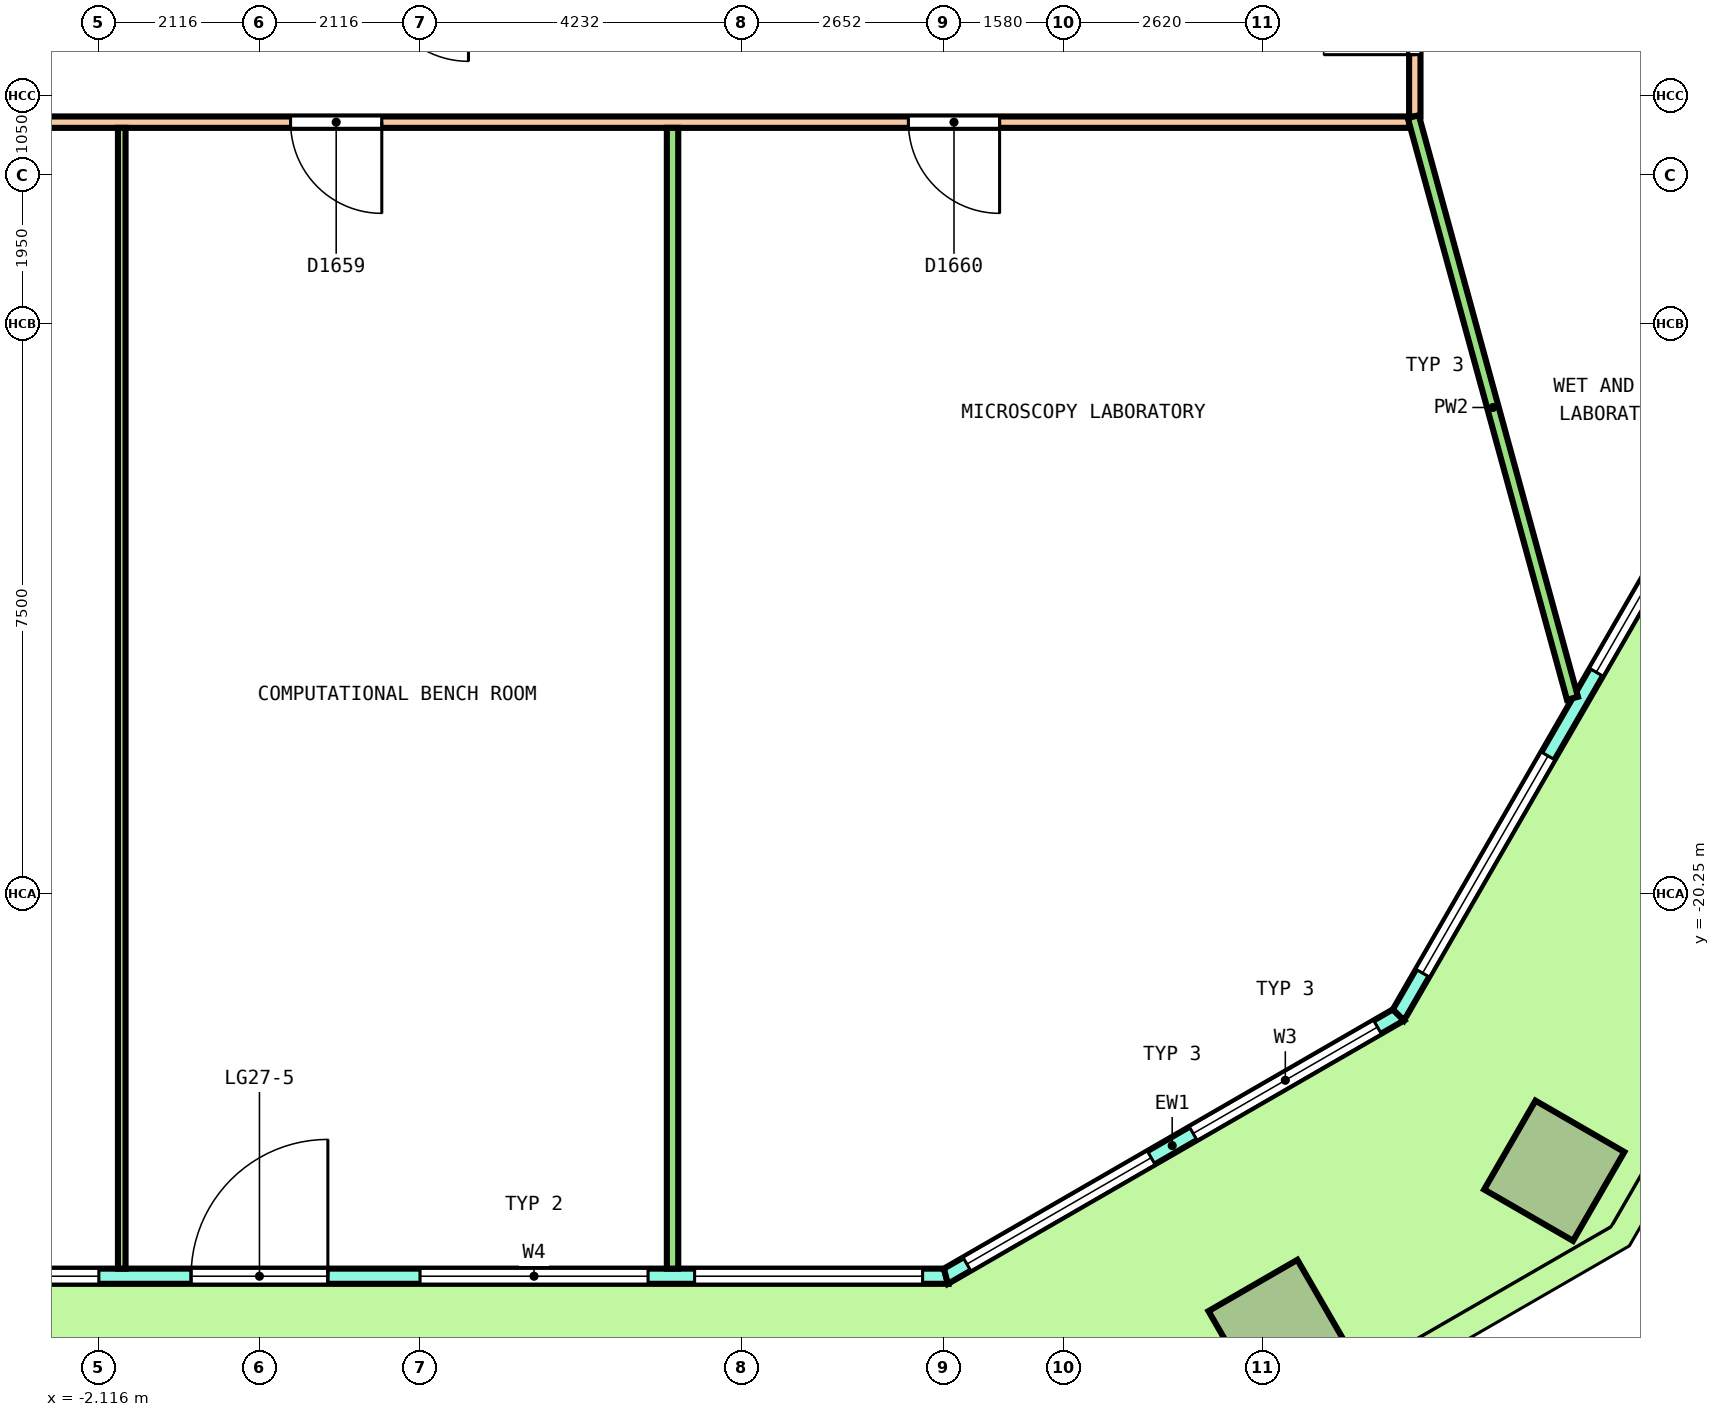
"""IFC4 building model, lengths in metres.
Left out: names, types, materials, properties, quantities, classifications, styles, units other than length and angle.
Written with IfcOpenShell. Run it as: python <this file> out.ifc"""

import sys

from ifc_helpers import new_model, si_unit, direction, frame, frame_2d, origin, origin_2d, place, context, subcontext, project, spatial, polyline, rectangle, outline, extrude, element, fill, save


model = new_model("IFC4")
c1 = context("Model", 3, precision=1e-05, world=origin(), true_north=direction((0.0, 1.0)))
c2 = subcontext(c1, "Body", "Model", "MODEL_VIEW")
j1 = project(units=[si_unit("LENGTHUNIT", "METRE"), si_unit("PLANEANGLEUNIT", "RADIAN")], contexts=[c1])
p1 = place(None, origin())
s1 = spatial("IfcSite", under=j1, at=p1, CompositionType="ELEMENT")
p2 = place(p1, origin())
s2 = spatial("IfcBuilding", under=s1, at=p2, CompositionType="ELEMENT")
p3 = place(p2, frame((0.0, 0.0, 126.4)))
s3 = spatial("IfcBuildingStorey", under=s2, at=p3, CompositionType="ELEMENT", Elevation=126.4)
for number, where, z_axis, x_axis in (
    (1, (13.408, -25.989, 0.0), (0.0, 0.0, 1.0), (0.866, 0.5, 0.0)),
    (2, (17.035, -23.895, 0.0), (0.0, 0.0, 1.0), (0.5, 0.866, 0.0)),
):
    element("IfcColumn", number, at=place(p3, frame(where, z_axis=z_axis, x_axis=x_axis)), inside=s3, PredefinedType="COLUMN", context=c2, shape_type="SweptSolid", body=[
        extrude(rectangle(XDim=1.35, YDim=1.35, at=origin_2d()), origin(), (0.0, 0.0, 1.0), 4.05),
    ])
p4 = place(p3, frame((-9.031, -25.283, 0.0), z_axis=(0.0, 0.0, 1.0), x_axis=(1.0, 0.0, 0.0)))
e3 = element("IfcWall", 3, at=p4, inside=s3, PredefinedType="SOLIDWALL", context=c2, shape_type="SweptSolid", body=[
    extrude(outline(polyline([(-0.027, -0.1), (0.979, -0.1), (1.986, -0.1), (2.992, -0.1), (3.999, -0.1), (5.005, -0.1), (6.012, -0.1), (7.018, -0.1), (8.025, -0.1), (9.031, -0.1), (10.038, -0.1), (11.044, -0.1), (12.051, -0.1), (13.057, -0.1), (14.063, -0.1), (15.07, -0.1), (16.076, -0.1), (17.083, -0.1), (18.089, -0.1), (18.036, 0.1), (17.035, 0.1), (16.035, 0.1), (15.034, 0.1), (14.034, 0.1), (13.033, 0.1), (12.033, 0.1), (11.032, 0.1), (10.032, 0.1), (9.031, 0.1), (8.031, 0.1), (7.03, 0.1), (6.03, 0.1), (5.029, 0.1), (4.029, 0.1), (3.028, 0.1), (2.028, 0.1), (1.027, 0.1), (0.027, 0.1), (-0.027, -0.1)])), origin(), (0.0, 0.0, 1.0), 4.1),
])
p5 = place(p4, frame((0.306, 0.0, 0.1)))
e4 = element("IfcOpeningElement", 4, at=p5, cuts=e3, PredefinedType="OPENING", context=c2, shape_type="SweptSolid", body=[
    extrude(rectangle(XDim=3.0, YDim=2.9, at=frame_2d((1.5, 1.45))), frame((0.0, 0.11, 0.0), z_axis=(0.0, -1.0, 0.0), x_axis=(1.0, 0.0, 0.0)), (0.0, 0.0, 1.0), 0.22),
])
p6 = place(p4, frame((3.919, 0.0, 0.1)))
e5 = element("IfcOpeningElement", 5, at=p6, cuts=e3, PredefinedType="OPENING", context=c2, shape_type="SweptSolid", body=[
    extrude(rectangle(XDim=3.0, YDim=2.9, at=frame_2d((1.5, 1.45))), frame((0.0, 0.11, 0.0), z_axis=(0.0, -1.0, 0.0), x_axis=(1.0, 0.0, 0.0)), (0.0, 0.0, 1.0), 0.22),
])
p7 = place(p4, frame((8.131, 0.0, 0.0)))
e6 = element("IfcOpeningElement", 6, at=p7, cuts=e3, PredefinedType="OPENING", context=c2, shape_type="SweptSolid", body=[
    extrude(rectangle(XDim=1.8, YDim=2.4, at=frame_2d((0.9, 1.2))), frame((0.0, 0.11, 0.0), z_axis=(0.0, -1.0, 0.0), x_axis=(1.0, 0.0, 0.0)), (0.0, 0.0, 1.0), 0.22),
])
p8 = place(p4, frame((8.131, 0.0, 2.55)))
e7 = element("IfcOpeningElement", 7, at=p8, cuts=e3, PredefinedType="OPENING", context=c2, shape_type="SweptSolid", body=[
    extrude(rectangle(XDim=1.8, YDim=0.45, at=frame_2d((0.9, 0.225))), frame((0.0, 0.11, 0.0), z_axis=(0.0, -1.0, 0.0), x_axis=(1.0, 0.0, 0.0)), (0.0, 0.0, 1.0), 0.22),
])
p9 = place(p4, frame((11.144, 0.0, 0.1)))
e8 = element("IfcOpeningElement", 8, at=p9, cuts=e3, PredefinedType="OPENING", context=c2, shape_type="SweptSolid", body=[
    extrude(rectangle(XDim=3.0, YDim=2.9, at=frame_2d((1.5, 1.45))), frame((0.0, 0.11, 0.0), z_axis=(0.0, -1.0, 0.0), x_axis=(1.0, 0.0, 0.0)), (0.0, 0.0, 1.0), 0.22),
])
p10 = place(p4, frame((14.756, 0.0, 0.1)))
e9 = element("IfcOpeningElement", 9, at=p10, cuts=e3, PredefinedType="OPENING", context=c2, shape_type="SweptSolid", body=[
    extrude(rectangle(XDim=3.0, YDim=2.9, at=frame_2d((1.5, 1.45))), frame((0.0, 0.11, 0.0), z_axis=(0.0, -1.0, 0.0), x_axis=(1.0, 0.0, 0.0)), (0.0, 0.0, 1.0), 0.22),
])
p11 = place(p3, frame((9.031, -25.283, 0.0), z_axis=(0.0, 0.0, 1.0), x_axis=(0.866029458321, 0.49999297727, 0.0)))
e10 = element("IfcWall", 10, at=p11, inside=s3, PredefinedType="SOLIDWALL", context=c2, shape_type="SweptSolid", body=[
    extrude(outline(polyline([(-0.027, -0.1), (1.128, -0.1), (2.282, -0.1), (3.437, -0.1), (4.592, -0.1), (5.747, -0.1), (6.901, -0.1), (6.848, 0.1), (5.711, 0.1), (4.574, 0.1), (3.437, 0.1), (2.301, 0.1), (1.164, 0.1), (0.027, 0.1), (-0.027, -0.1)])), origin(), (0.0, 0.0, 1.0), 4.1),
])
p12 = place(p11, frame((0.319, 0.0, 0.1)))
e11 = element("IfcOpeningElement", 11, at=p12, cuts=e10, PredefinedType="OPENING", context=c2, shape_type="SweptSolid", body=[
    extrude(rectangle(XDim=2.8, YDim=2.9, at=frame_2d((1.4, 1.45))), frame((0.0, 0.11, 0.0), z_axis=(0.0, -1.0, 0.0), x_axis=(1.0, 0.0, 0.0)), (0.0, 0.0, 1.0), 0.22),
])
p13 = place(p11, frame((3.756, 0.0, 0.1)))
e12 = element("IfcOpeningElement", 12, at=p13, cuts=e10, PredefinedType="OPENING", context=c2, shape_type="SweptSolid", body=[
    extrude(rectangle(XDim=2.8, YDim=2.9, at=frame_2d((1.4, 1.45))), frame((0.0, 0.11, 0.0), z_axis=(0.0, -1.0, 0.0), x_axis=(1.0, 0.0, 0.0)), (0.0, 0.0, 1.0), 0.22),
])
p14 = place(p3, frame((14.985, -21.845, 0.0), z_axis=(0.0, 0.0, 1.0), x_axis=(0.50000204422, 0.86602422355, 0.0)))
e13 = element("IfcWall", 13, at=p14, inside=s3, PredefinedType="SOLIDWALL", context=c2, shape_type="SweptSolid", body=[
    extrude(outline(polyline([(-0.027, -0.1), (1.014, -0.1), (2.055, -0.1), (3.097, -0.1), (4.138, -0.1), (5.179, -0.1), (6.22, -0.1), (7.261, -0.1), (8.303, -0.1), (9.344, -0.1), (10.385, -0.1), (11.426, -0.1), (12.468, -0.1), (13.509, -0.1), (14.55, -0.1), (15.591, -0.1), (16.632, -0.1), (17.673, -0.1), (18.715, -0.1), (19.756, -0.1), (20.797, -0.1), (21.838, -0.1), (22.879, -0.1), (22.826, 0.1), (21.789, 0.1), (20.753, 0.1), (19.717, 0.1), (18.68, 0.1), (17.644, 0.1), (16.608, 0.1), (15.572, 0.1), (14.535, 0.1), (13.499, 0.1), (12.463, 0.1), (11.426, 0.1), (10.39, 0.1), (9.354, 0.1), (8.317, 0.1), (7.281, 0.1), (6.245, 0.1), (5.208, 0.1), (4.172, 0.1), (3.136, 0.1), (2.099, 0.1), (1.063, 0.1), (0.027, 0.1), (-0.027, -0.1)])), origin(), (0.0, 0.0, 1.0), 4.1),
])
p15 = place(p14, frame((0.635, 0.0, 0.1)))
e14 = element("IfcOpeningElement", 14, at=p15, cuts=e13, PredefinedType="OPENING", context=c2, shape_type="SweptSolid", body=[
    extrude(rectangle(XDim=3.3, YDim=2.9, at=frame_2d((1.65, 1.45))), frame((0.0, 0.11, 0.0), z_axis=(0.0, -1.0, 0.0), x_axis=(1.0, 0.0, 0.0)), (0.0, 0.0, 1.0), 0.22),
])
p16 = place(p14, frame((5.206, 0.0, 0.1)))
e15 = element("IfcOpeningElement", 15, at=p16, cuts=e13, PredefinedType="OPENING", context=c2, shape_type="SweptSolid", body=[
    extrude(rectangle(XDim=3.3, YDim=2.9, at=frame_2d((1.65, 1.45))), frame((0.0, 0.11, 0.0), z_axis=(0.0, -1.0, 0.0), x_axis=(1.0, 0.0, 0.0)), (0.0, 0.0, 1.0), 0.22),
])
p17 = place(p14, frame((10.526, 0.0, 0.0)))
e16 = element("IfcOpeningElement", 16, at=p17, cuts=e13, PredefinedType="OPENING", context=c2, shape_type="SweptSolid", body=[
    extrude(rectangle(XDim=1.8, YDim=2.4, at=frame_2d((0.9, 1.2))), frame((0.0, 0.11, 0.0), z_axis=(0.0, -1.0, 0.0), x_axis=(1.0, 0.0, 0.0)), (0.0, 0.0, 1.0), 0.22),
])
p18 = place(p14, frame((10.526, 0.0, 2.55)))
e17 = element("IfcOpeningElement", 17, at=p18, cuts=e13, PredefinedType="OPENING", context=c2, shape_type="SweptSolid", body=[
    extrude(rectangle(XDim=1.8, YDim=0.45, at=frame_2d((0.9, 0.225))), frame((0.0, 0.11, 0.0), z_axis=(0.0, -1.0, 0.0), x_axis=(1.0, 0.0, 0.0)), (0.0, 0.0, 1.0), 0.22),
])
p19 = place(p14, frame((14.347, 0.0, 0.1)))
e18 = element("IfcOpeningElement", 18, at=p19, cuts=e13, PredefinedType="OPENING", context=c2, shape_type="SweptSolid", body=[
    extrude(rectangle(XDim=3.3, YDim=2.9, at=frame_2d((1.65, 1.45))), frame((0.0, 0.11, 0.0), z_axis=(0.0, -1.0, 0.0), x_axis=(1.0, 0.0, 0.0)), (0.0, 0.0, 1.0), 0.22),
])
p20 = place(p14, frame((18.917, 0.0, 0.1)))
e19 = element("IfcOpeningElement", 19, at=p20, cuts=e13, PredefinedType="OPENING", context=c2, shape_type="SweptSolid", body=[
    extrude(rectangle(XDim=3.3, YDim=2.9, at=frame_2d((1.65, 1.45))), frame((0.0, 0.11, 0.0), z_axis=(0.0, -1.0, 0.0), x_axis=(1.0, 0.0, 0.0)), (0.0, 0.0, 1.0), 0.22),
])
p21 = place(p3, frame((15.2, -10.025, 0.0), z_axis=(0.0, 0.0, 1.0), x_axis=(0.0, 1.0, 0.0)))
e20 = element("IfcWall", 20, at=p21, inside=s3, PredefinedType="PARTITIONING", context=c2, shape_type="SweptSolid", body=[
    extrude(rectangle(XDim=8.75, YDim=0.15, at=frame_2d((4.375, 0.0))), origin(), (0.0, 0.0, 1.0), 3.05),
])
p22 = place(p21, frame((0.813, 0.0, 0.0)))
e21 = element("IfcOpeningElement", 21, at=p22, cuts=e20, PredefinedType="OPENING", context=c2, shape_type="SweptSolid", body=[
    extrude(rectangle(XDim=1.2, YDim=2.1, at=frame_2d((0.6, 1.05))), frame((0.0, 0.085, 0.0), z_axis=(0.0, -1.0, 0.0), x_axis=(1.0, 0.0, 0.0)), (0.0, 0.0, 1.0), 0.17),
])
p23 = place(p3, frame((-15.275, -10.1, 0.0), z_axis=(0.0, 0.0, 1.0), x_axis=(1.0, 0.0, 0.0)))
e22 = element("IfcWall", 22, at=p23, inside=s3, PredefinedType="PARTITIONING", context=c2, shape_type="SweptSolid", body=[
    extrude(rectangle(XDim=30.4, YDim=0.15, at=frame_2d((15.2, 0.0))), origin(), (0.0, 0.0, 1.0), 3.05),
])
p24 = place(p23, frame((1.506, 0.0, 0.0)))
e23 = element("IfcOpeningElement", 23, at=p24, cuts=e22, PredefinedType="OPENING", context=c2, shape_type="SweptSolid", body=[
    extrude(rectangle(XDim=1.0, YDim=2.1, at=frame_2d((0.5, 1.05))), frame((0.0, 0.085, 0.0), z_axis=(0.0, -1.0, 0.0), x_axis=(1.0, 0.0, 0.0)), (0.0, 0.0, 1.0), 0.17),
])
p25 = place(p23, frame((7.84, 0.0, 0.0)))
e24 = element("IfcOpeningElement", 24, at=p25, cuts=e22, PredefinedType="OPENING", context=c2, shape_type="SweptSolid", body=[
    extrude(rectangle(XDim=1.0, YDim=2.1, at=frame_2d((0.5, 1.05))), frame((0.0, 0.085, 0.0), z_axis=(0.0, -1.0, 0.0), x_axis=(1.0, 0.0, 0.0)), (0.0, 0.0, 1.0), 0.17),
])
p26 = place(p23, frame((15.685, 0.0, 0.0)))
e25 = element("IfcOpeningElement", 25, at=p26, cuts=e22, PredefinedType="OPENING", context=c2, shape_type="SweptSolid", body=[
    extrude(rectangle(XDim=1.2, YDim=2.1, at=frame_2d((0.6, 1.05))), frame((0.0, 0.085, 0.0), z_axis=(0.0, -1.0, 0.0), x_axis=(1.0, 0.0, 0.0)), (0.0, 0.0, 1.0), 0.17),
])
p27 = place(p23, frame((23.812, 0.0, 0.0)))
e26 = element("IfcOpeningElement", 26, at=p27, cuts=e22, PredefinedType="OPENING", context=c2, shape_type="SweptSolid", body=[
    extrude(rectangle(XDim=1.2, YDim=2.1, at=frame_2d((0.6, 1.05))), frame((0.0, 0.085, 0.0), z_axis=(0.0, -1.0, 0.0), x_axis=(1.0, 0.0, 0.0)), (0.0, 0.0, 1.0), 0.17),
])
p28 = place(p3, frame((5.435, -25.183, 0.0), z_axis=(0.0, 0.0, 1.0), x_axis=(0.0, 1.0, 0.0)))
e27 = element("IfcWall", 27, at=p28, inside=s3, PredefinedType="PARTITIONING", context=c2, shape_type="SweptSolid", body=[
    extrude(rectangle(XDim=15.008, YDim=0.15, at=frame_2d((7.504, 0.0))), origin(), (0.0, 0.0, 1.0), 3.05),
])
p29 = place(p3, frame((15.18, -10.028, 0.0), z_axis=(0.0, 0.0, 1.0), x_axis=(0.263973985393, -0.964529799973, 0.0)))
e28 = element("IfcWall", 28, at=p29, inside=s3, PredefinedType="PARTITIONING", context=c2, shape_type="SweptSolid", body=[
    extrude(rectangle(XDim=7.934, YDim=0.15, at=frame_2d((3.967, 0.0))), origin(), (0.0, 0.0, 1.0), 3.05),
])
p30 = place(p3, frame((-1.812, -25.183, 0.0), z_axis=(0.0, 0.0, 1.0), x_axis=(0.0, 1.0, 0.0)))
e29 = element("IfcWall", 29, at=p30, inside=s3, PredefinedType="PARTITIONING", context=c2, shape_type="SweptSolid", body=[
    extrude(rectangle(XDim=15.008, YDim=0.1, at=frame_2d((7.504, 0.0))), origin(), (0.0, 0.0, 1.0), 3.05),
])
p31 = place(p6, origin())
e30 = element("IfcWindow", 30, at=p31, inside=s3, PartitioningType="SINGLE_PANEL", PredefinedType="WINDOW", context=c2, shape_type="SweptSolid", body=[
    extrude(rectangle(XDim=3.0, YDim=2.9, at=frame_2d((1.5, 1.45))), frame((0.0, 0.03, 0.0), z_axis=(0.0, -1.0, 0.0), x_axis=(1.0, 0.0, 0.0)), (0.0, 0.0, 1.0), 0.06),
])
fill(e5, e30)
p32 = place(p7, origin())
e31 = element("IfcDoor", 31, at=p32, inside=s3, OperationType="DOUBLE_DOOR_SINGLE_SWING", PredefinedType="DOOR", context=c2, shape_type="SweptSolid", body=[
    extrude(rectangle(XDim=1.8, YDim=2.4, at=frame_2d((0.9, 1.2))), frame((0.0, 0.025, 0.0), z_axis=(0.0, -1.0, 0.0), x_axis=(1.0, 0.0, 0.0)), (0.0, 0.0, 1.0), 0.05),
])
fill(e6, e31)
p33 = place(p8, origin())
e32 = element("IfcWindow", 32, at=p33, inside=s3, PartitioningType="SINGLE_PANEL", PredefinedType="WINDOW", context=c2, shape_type="SweptSolid", body=[
    extrude(rectangle(XDim=1.8, YDim=0.45, at=frame_2d((0.9, 0.225))), frame((0.0, 0.03, 0.0), z_axis=(0.0, -1.0, 0.0), x_axis=(1.0, 0.0, 0.0)), (0.0, 0.0, 1.0), 0.06),
])
fill(e7, e32)
p34 = place(p9, origin())
e33 = element("IfcWindow", 33, at=p34, inside=s3, PartitioningType="SINGLE_PANEL", PredefinedType="WINDOW", context=c2, shape_type="SweptSolid", body=[
    extrude(rectangle(XDim=3.0, YDim=2.9, at=frame_2d((1.5, 1.45))), frame((0.0, 0.03, 0.0), z_axis=(0.0, -1.0, 0.0), x_axis=(1.0, 0.0, 0.0)), (0.0, 0.0, 1.0), 0.06),
])
fill(e8, e33)
p35 = place(p10, origin())
e34 = element("IfcWindow", 34, at=p35, inside=s3, PartitioningType="SINGLE_PANEL", PredefinedType="WINDOW", context=c2, shape_type="SweptSolid", body=[
    extrude(rectangle(XDim=3.0, YDim=2.9, at=frame_2d((1.5, 1.45))), frame((0.0, 0.03, 0.0), z_axis=(0.0, -1.0, 0.0), x_axis=(1.0, 0.0, 0.0)), (0.0, 0.0, 1.0), 0.06),
])
fill(e9, e34)
p36 = place(p12, origin())
e35 = element("IfcWindow", 35, at=p36, inside=s3, PartitioningType="SINGLE_PANEL", PredefinedType="WINDOW", context=c2, shape_type="SweptSolid", body=[
    extrude(rectangle(XDim=2.8, YDim=2.9, at=frame_2d((1.4, 1.45))), frame((0.0, 0.03, 0.0), z_axis=(0.0, -1.0, 0.0), x_axis=(1.0, 0.0, 0.0)), (0.0, 0.0, 1.0), 0.06),
])
fill(e11, e35)
p37 = place(p13, origin())
e36 = element("IfcWindow", 36, at=p37, inside=s3, PartitioningType="SINGLE_PANEL", PredefinedType="WINDOW", context=c2, shape_type="SweptSolid", body=[
    extrude(rectangle(XDim=2.8, YDim=2.9, at=frame_2d((1.4, 1.45))), frame((0.0, 0.03, 0.0), z_axis=(0.0, -1.0, 0.0), x_axis=(1.0, 0.0, 0.0)), (0.0, 0.0, 1.0), 0.06),
])
fill(e12, e36)
p38 = place(p15, origin())
e37 = element("IfcWindow", 37, at=p38, inside=s3, PartitioningType="SINGLE_PANEL", PredefinedType="WINDOW", context=c2, shape_type="SweptSolid", body=[
    extrude(rectangle(XDim=3.3, YDim=2.9, at=frame_2d((1.65, 1.45))), frame((0.0, 0.03, 0.0), z_axis=(0.0, -1.0, 0.0), x_axis=(1.0, 0.0, 0.0)), (0.0, 0.0, 1.0), 0.06),
])
fill(e14, e37)
p39 = place(p16, origin())
e38 = element("IfcWindow", 38, at=p39, inside=s3, PartitioningType="SINGLE_PANEL", PredefinedType="WINDOW", context=c2, shape_type="SweptSolid", body=[
    extrude(rectangle(XDim=3.3, YDim=2.9, at=frame_2d((1.65, 1.45))), frame((0.0, 0.03, 0.0), z_axis=(0.0, -1.0, 0.0), x_axis=(1.0, 0.0, 0.0)), (0.0, 0.0, 1.0), 0.06),
])
fill(e15, e38)
p40 = place(p26, origin())
e39 = element("IfcDoor", 39, at=p40, inside=s3, OperationType="DOUBLE_DOOR_SINGLE_SWING", PredefinedType="DOOR", context=c2, shape_type="SweptSolid", body=[
    extrude(rectangle(XDim=1.2, YDim=2.1, at=frame_2d((0.6, 1.05))), frame((0.0, 0.025, 0.0), z_axis=(0.0, -1.0, 0.0), x_axis=(1.0, 0.0, 0.0)), (0.0, 0.0, 1.0), 0.05),
])
fill(e25, e39)
p41 = place(p27, origin())
e40 = element("IfcDoor", 40, at=p41, inside=s3, OperationType="DOUBLE_DOOR_SINGLE_SWING", PredefinedType="DOOR", context=c2, shape_type="SweptSolid", body=[
    extrude(rectangle(XDim=1.2, YDim=2.1, at=frame_2d((0.6, 1.05))), frame((0.0, 0.025, 0.0), z_axis=(0.0, -1.0, 0.0), x_axis=(1.0, 0.0, 0.0)), (0.0, 0.0, 1.0), 0.05),
])
fill(e26, e40)
p42 = place(p22, origin())
e41 = element("IfcDoor", 41, at=p42, inside=s3, OperationType="DOUBLE_DOOR_SINGLE_SWING", PredefinedType="DOOR", context=c2, shape_type="SweptSolid", body=[
    extrude(rectangle(XDim=1.2, YDim=2.1, at=frame_2d((0.6, 1.05))), frame((0.0, 0.025, 0.0), z_axis=(0.0, -1.0, 0.0), x_axis=(1.0, 0.0, 0.0)), (0.0, 0.0, 1.0), 0.05),
])
fill(e21, e41)
save(model, sys.argv[1])
